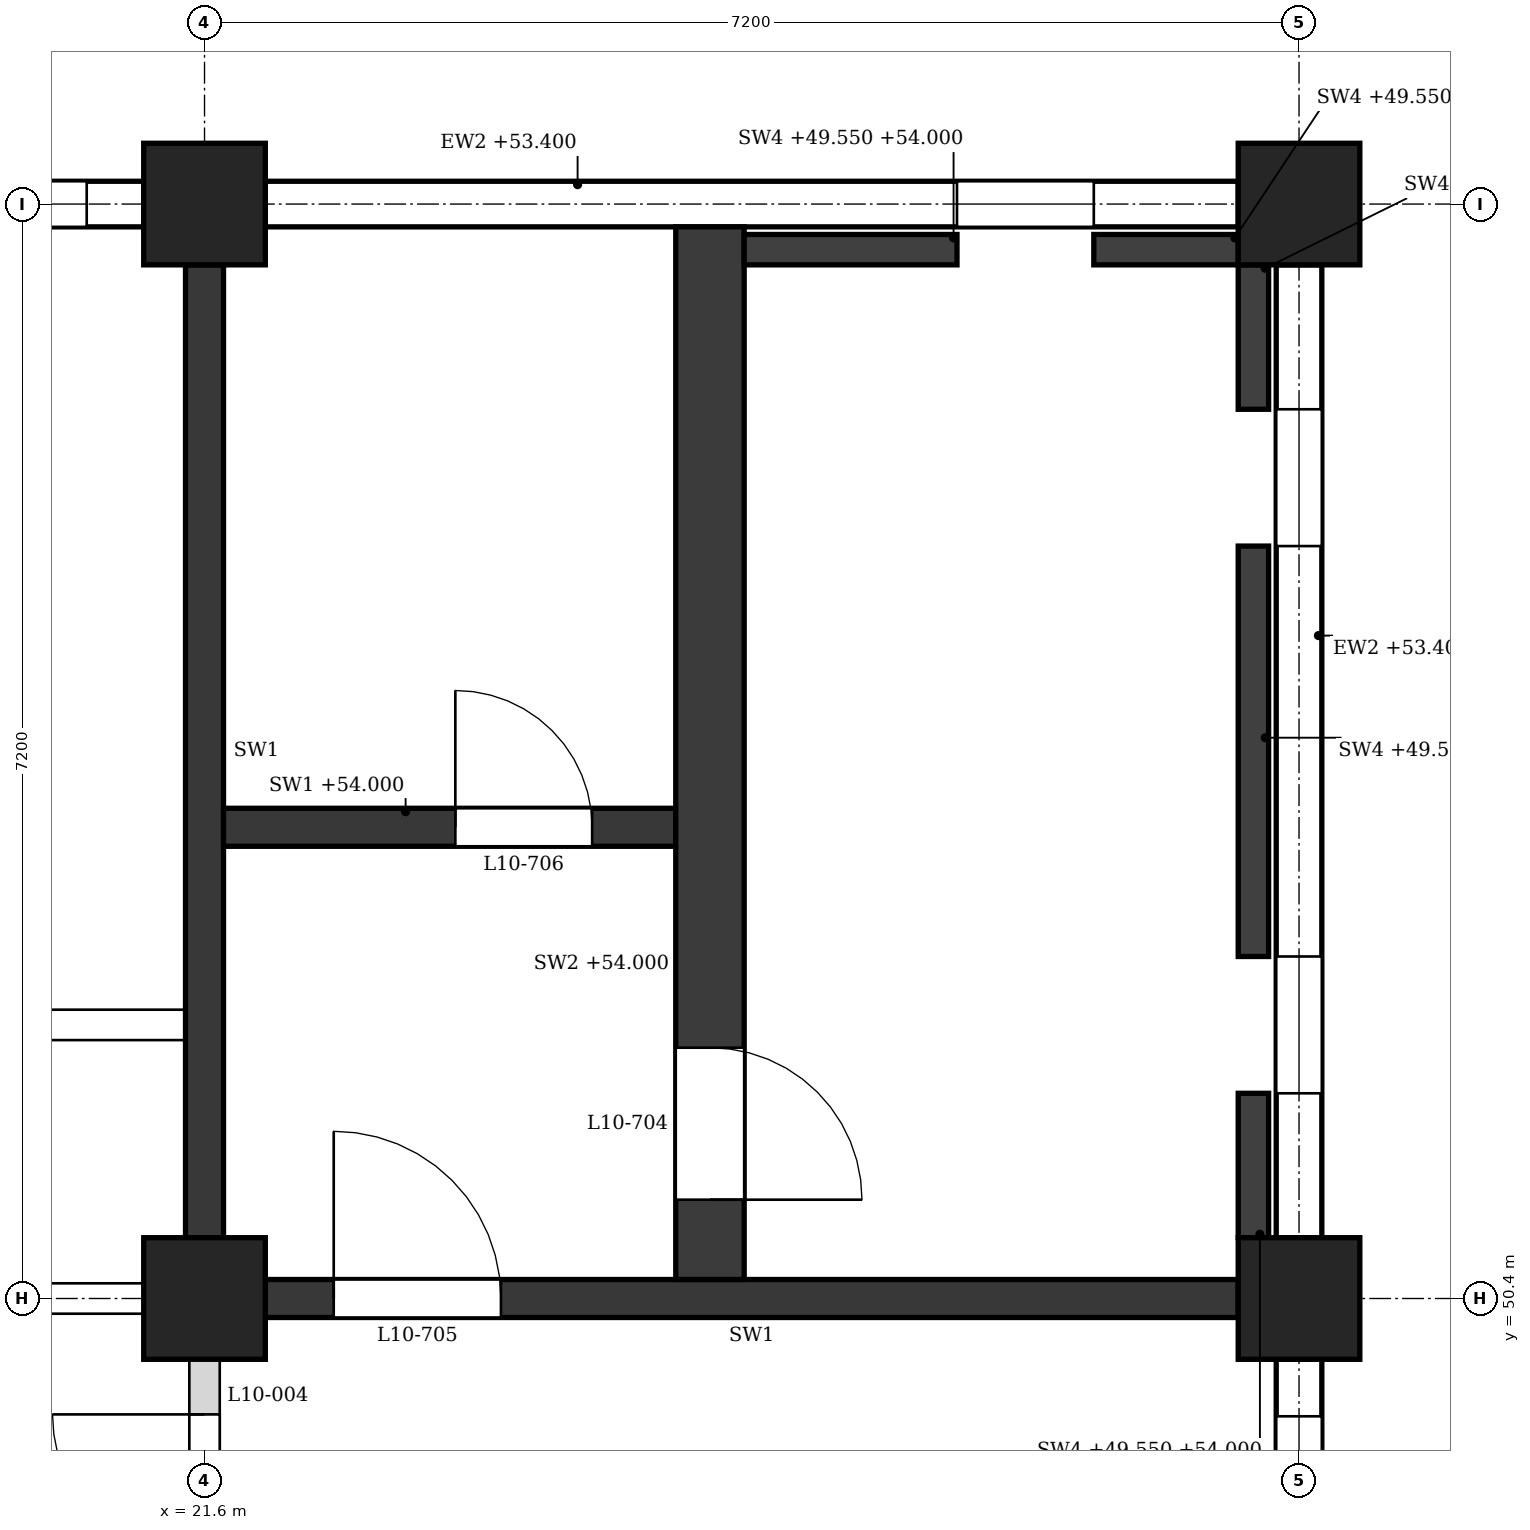
"""IFC4 building model, lengths in metres.
Left out: names, types, materials, properties, quantities, classifications, styles, units other than length and angle.
Written with IfcOpenShell. Run it as: python <this file> out.ifc"""

import sys

from ifc_helpers import new_model, si_unit, direction, frame, frame_2d, origin, origin_2d, place, context, subcontext, project, spatial, polyline, rectangle, outline, extrude, element, fill, save


model = new_model("IFC4")
c1 = context("Model", 3, precision=1e-05, world=origin(), true_north=direction((0.0, 1.0)))
c2 = subcontext(c1, "Body", "Model", "MODEL_VIEW")
j1 = project(units=[si_unit("LENGTHUNIT", "METRE"), si_unit("PLANEANGLEUNIT", "RADIAN")], contexts=[c1])
p1 = place(None, origin())
s1 = spatial("IfcSite", under=j1, at=p1, CompositionType="ELEMENT")
p2 = place(p1, origin())
s2 = spatial("IfcBuilding", under=s1, at=p2, CompositionType="ELEMENT")
p3 = place(p2, frame((0.0, 0.0, 49.8)))
s3 = spatial("IfcBuildingStorey", under=s2, at=p3, CompositionType="ELEMENT", Elevation=49.8)
for number, where, z_axis, x_axis in (
    (1, (21.6, 50.4, 0.0), (0.0, 0.0, 1.0), (1.0, 0.0, 0.0)),
    (2, (21.6, 57.6, 0.0), (0.0, 0.0, 1.0), (1.0, 0.0, 0.0)),
    (3, (28.8, 50.4, 0.0), (0.0, 0.0, 1.0), (1.0, 0.0, 0.0)),
    (4, (28.8, 57.6, 0.0), (0.0, 0.0, 1.0), (1.0, 0.0, 0.0)),
):
    element("IfcColumn", number, at=place(p3, frame(where, z_axis=z_axis, x_axis=x_axis)), inside=s3, PredefinedType="COLUMN", context=c2, shape_type="SweptSolid", body=[
        extrude(rectangle(XDim=0.8, YDim=0.8, at=origin_2d()), origin(), (0.0, 0.0, 1.0), 4.5),
    ])
p4 = place(p3, frame((28.4, 57.6, 0.0), z_axis=(0.0, 0.0, 1.0), x_axis=(-1.0, 0.0, 0.0)))
e5 = element("IfcWall", 5, at=p4, inside=s3, PredefinedType="STANDARD", context=c2, shape_type="SweptSolid", body=[
    extrude(rectangle(XDim=6.4, YDim=0.3, at=frame_2d((3.2, 0.0))), origin(), (0.0, 0.0, 1.0), 3.6),
])
p5 = place(p4, frame((0.95, 0.0, 0.9)))
e6 = element("IfcOpeningElement", 6, at=p5, cuts=e5, PredefinedType="OPENING", context=c2, shape_type="SweptSolid", body=[
    extrude(outline(polyline([(0.0, 0.0), (0.9, 0.0), (0.9, 2.15), (0.45, 2.6), (0.0, 2.15), (0.0, 0.0)])), frame((0.0, 0.16, 0.0), z_axis=(0.0, -1.0, 0.0), x_axis=(1.0, 0.0, 0.0)), (0.0, 0.0, 1.0), 0.32),
])
p6 = place(p3, frame((21.2, 57.6, 0.0), z_axis=(0.0, 0.0, 1.0), x_axis=(-1.0, 0.0, 0.0)))
e7 = element("IfcWall", 7, at=p6, inside=s3, PredefinedType="STANDARD", context=c2, shape_type="SweptSolid", body=[
    extrude(rectangle(XDim=6.4, YDim=0.3, at=frame_2d((3.2, 0.0))), origin(), (0.0, 0.0, 1.0), 3.6),
])
p7 = place(p6, frame((0.375, 0.0, 0.9)))
e8 = element("IfcOpeningElement", 8, at=p7, cuts=e7, PredefinedType="OPENING", context=c2, shape_type="SweptSolid", body=[
    extrude(outline(polyline([(0.0, 0.0), (0.45, 0.0), (0.45, 2.35), (0.225, 2.6), (0.0, 2.35), (0.0, 0.0)])), frame((0.0, 0.16, 0.0), z_axis=(0.0, -1.0, 0.0), x_axis=(1.0, 0.0, 0.0)), (0.0, 0.0, 1.0), 0.32),
])
p8 = place(p6, frame((1.175, 0.0, 0.9)))
e9 = element("IfcOpeningElement", 9, at=p8, cuts=e7, PredefinedType="OPENING", context=c2, shape_type="SweptSolid", body=[
    extrude(outline(polyline([(0.0, 0.0), (0.45, 0.0), (0.45, 2.35), (0.225, 2.6), (0.0, 2.35), (0.0, 0.0)])), frame((0.0, 0.16, 0.0), z_axis=(0.0, -1.0, 0.0), x_axis=(1.0, 0.0, 0.0)), (0.0, 0.0, 1.0), 0.32),
])
p9 = place(p6, frame((1.975, 0.0, 0.9)))
e10 = element("IfcOpeningElement", 10, at=p9, cuts=e7, PredefinedType="OPENING", context=c2, shape_type="SweptSolid", body=[
    extrude(outline(polyline([(0.0, 0.0), (0.45, 0.0), (0.45, 2.35), (0.225, 2.6), (0.0, 2.35), (0.0, 0.0)])), frame((0.0, 0.16, 0.0), z_axis=(0.0, -1.0, 0.0), x_axis=(1.0, 0.0, 0.0)), (0.0, 0.0, 1.0), 0.32),
])
p10 = place(p6, frame((3.975, 0.0, 0.9)))
e11 = element("IfcOpeningElement", 11, at=p10, cuts=e7, PredefinedType="OPENING", context=c2, shape_type="SweptSolid", body=[
    extrude(outline(polyline([(0.0, 0.0), (0.45, 0.0), (0.45, 2.35), (0.225, 2.6), (0.0, 2.35), (0.0, 0.0)])), frame((0.0, 0.16, 0.0), z_axis=(0.0, -1.0, 0.0), x_axis=(1.0, 0.0, 0.0)), (0.0, 0.0, 1.0), 0.32),
])
p11 = place(p6, frame((4.775, 0.0, 0.9)))
e12 = element("IfcOpeningElement", 12, at=p11, cuts=e7, PredefinedType="OPENING", context=c2, shape_type="SweptSolid", body=[
    extrude(outline(polyline([(0.0, 0.0), (0.45, 0.0), (0.45, 2.35), (0.225, 2.6), (0.0, 2.35), (0.0, 0.0)])), frame((0.0, 0.16, 0.0), z_axis=(0.0, -1.0, 0.0), x_axis=(1.0, 0.0, 0.0)), (0.0, 0.0, 1.0), 0.32),
])
p12 = place(p6, frame((5.575, 0.0, 0.9)))
e13 = element("IfcOpeningElement", 13, at=p12, cuts=e7, PredefinedType="OPENING", context=c2, shape_type="SweptSolid", body=[
    extrude(outline(polyline([(0.0, 0.0), (0.45, 0.0), (0.45, 2.35), (0.225, 2.6), (0.0, 2.35), (0.0, 0.0)])), frame((0.0, 0.16, 0.0), z_axis=(0.0, -1.0, 0.0), x_axis=(1.0, 0.0, 0.0)), (0.0, 0.0, 1.0), 0.32),
])
p13 = place(p3, frame((28.8, 43.6, 0.0), z_axis=(0.0, 0.0, 1.0), x_axis=(0.0, 1.0, 0.0)))
e14 = element("IfcWall", 14, at=p13, inside=s3, PredefinedType="STANDARD", context=c2, shape_type="SweptSolid", body=[
    extrude(rectangle(XDim=6.4, YDim=0.3, at=frame_2d((3.2, 0.0))), origin(), (0.0, 0.0, 1.0), 3.6),
])
p14 = place(p13, frame((3.975, 0.0, 0.9)))
e15 = element("IfcOpeningElement", 15, at=p14, cuts=e14, PredefinedType="OPENING", context=c2, shape_type="SweptSolid", body=[
    extrude(outline(polyline([(0.0, 0.0), (0.45, 0.0), (0.45, 2.35), (0.225, 2.6), (0.0, 2.35), (0.0, 0.0)])), frame((0.0, 0.16, 0.0), z_axis=(0.0, -1.0, 0.0), x_axis=(1.0, 0.0, 0.0)), (0.0, 0.0, 1.0), 0.32),
])
p15 = place(p13, frame((4.775, 0.0, 0.9)))
e16 = element("IfcOpeningElement", 16, at=p15, cuts=e14, PredefinedType="OPENING", context=c2, shape_type="SweptSolid", body=[
    extrude(outline(polyline([(0.0, 0.0), (0.45, 0.0), (0.45, 2.35), (0.225, 2.6), (0.0, 2.35), (0.0, 0.0)])), frame((0.0, 0.16, 0.0), z_axis=(0.0, -1.0, 0.0), x_axis=(1.0, 0.0, 0.0)), (0.0, 0.0, 1.0), 0.32),
])
p16 = place(p13, frame((5.575, 0.0, 0.9)))
e17 = element("IfcOpeningElement", 17, at=p16, cuts=e14, PredefinedType="OPENING", context=c2, shape_type="SweptSolid", body=[
    extrude(outline(polyline([(0.0, 0.0), (0.45, 0.0), (0.45, 2.35), (0.225, 2.6), (0.0, 2.35), (0.0, 0.0)])), frame((0.0, 0.16, 0.0), z_axis=(0.0, -1.0, 0.0), x_axis=(1.0, 0.0, 0.0)), (0.0, 0.0, 1.0), 0.32),
])
p17 = place(p3, frame((28.8, 50.8, 0.0), z_axis=(0.0, 0.0, 1.0), x_axis=(0.0, 1.0, 0.0)))
e18 = element("IfcWall", 18, at=p17, inside=s3, PredefinedType="STANDARD", context=c2, shape_type="SweptSolid", body=[
    extrude(rectangle(XDim=6.4, YDim=0.3, at=frame_2d((3.2, 0.0))), origin(), (0.0, 0.0, 1.0), 3.6),
])
p18 = place(p17, frame((0.95, 0.0, 0.9)))
e19 = element("IfcOpeningElement", 19, at=p18, cuts=e18, PredefinedType="OPENING", context=c2, shape_type="SweptSolid", body=[
    extrude(outline(polyline([(0.0, 0.0), (0.9, 0.0), (0.9, 2.15), (0.45, 2.6), (0.0, 2.15), (0.0, 0.0)])), frame((0.0, 0.16, 0.0), z_axis=(0.0, -1.0, 0.0), x_axis=(1.0, 0.0, 0.0)), (0.0, 0.0, 1.0), 0.32),
])
p19 = place(p17, frame((4.55, 0.0, 0.9)))
e20 = element("IfcOpeningElement", 20, at=p19, cuts=e18, PredefinedType="OPENING", context=c2, shape_type="SweptSolid", body=[
    extrude(outline(polyline([(0.0, 0.0), (0.9, 0.0), (0.9, 2.15), (0.45, 2.6), (0.0, 2.15), (0.0, 0.0)])), frame((0.0, 0.16, 0.0), z_axis=(0.0, -1.0, 0.0), x_axis=(1.0, 0.0, 0.0)), (0.0, 0.0, 1.0), 0.32),
])
p20 = place(p3, frame((22.0, 50.4, 0.0), z_axis=(0.0, 0.0, 1.0), x_axis=(1.0, 0.0, 0.0)))
e21 = element("IfcWall", 21, at=p20, inside=s3, PredefinedType="SHEAR", context=c2, shape_type="SweptSolid", body=[
    extrude(rectangle(XDim=6.4, YDim=0.25, at=frame_2d((3.2, 0.0))), origin(), (0.0, 0.0, 1.0), 3.55),
])
p21 = place(p20, frame((0.45, 0.0, 0.0)))
e22 = element("IfcOpeningElement", 22, at=p21, cuts=e21, PredefinedType="OPENING", context=c2, shape_type="SweptSolid", body=[
    extrude(rectangle(XDim=1.1, YDim=2.1, at=frame_2d((0.55, 1.05))), frame((0.0, 0.135, 0.0), z_axis=(0.0, -1.0, 0.0), x_axis=(1.0, 0.0, 0.0)), (0.0, 0.0, 1.0), 0.27),
])
p22 = place(p3, frame((21.6, 50.8, 0.0), z_axis=(0.0, 0.0, 1.0), x_axis=(0.0, 1.0, 0.0)))
e23 = element("IfcWall", 23, at=p22, inside=s3, PredefinedType="SHEAR", context=c2, shape_type="SweptSolid", body=[
    extrude(rectangle(XDim=6.4, YDim=0.25, at=frame_2d((3.2, 0.0))), origin(), (0.0, 0.0, 1.0), 3.55),
])
p23 = place(p3, frame((28.5, 50.8, -0.25), z_axis=(0.0, 0.0, 1.0), x_axis=(0.0, 1.0, 0.0)))
e24 = element("IfcWall", 24, at=p23, inside=s3, PredefinedType="SHEAR", context=c2, shape_type="SweptSolid", body=[
    extrude(rectangle(XDim=0.95, YDim=0.2, at=frame_2d((0.475, 0.0))), origin(), (0.0, 0.0, 1.0), 4.45),
])
p24 = place(p3, frame((28.5, 52.65, -0.25), z_axis=(0.0, 0.0, 1.0), x_axis=(0.0, 1.0, 0.0)))
e25 = element("IfcWall", 25, at=p24, inside=s3, PredefinedType="SHEAR", context=c2, shape_type="SweptSolid", body=[
    extrude(rectangle(XDim=2.7, YDim=0.2, at=frame_2d((1.35, 0.0))), origin(), (0.0, 0.0, 1.0), 4.45),
])
p25 = place(p3, frame((28.5, 56.25, -0.25), z_axis=(0.0, 0.0, 1.0), x_axis=(0.0, 1.0, 0.0)))
e26 = element("IfcWall", 26, at=p25, inside=s3, PredefinedType="SHEAR", context=c2, shape_type="SweptSolid", body=[
    extrude(rectangle(XDim=0.95, YDim=0.2, at=frame_2d((0.475, 0.0))), origin(), (0.0, 0.0, 1.0), 4.45),
])
p26 = place(p3, frame((25.15, 57.3, -0.25), z_axis=(0.0, 0.0, 1.0), x_axis=(1.0, 0.0, 0.0)))
e27 = element("IfcWall", 27, at=p26, inside=s3, PredefinedType="SHEAR", context=c2, shape_type="SweptSolid", body=[
    extrude(rectangle(XDim=1.4, YDim=0.2, at=frame_2d((0.7, 0.0))), origin(), (0.0, 0.0, 1.0), 4.45),
])
p27 = place(p3, frame((27.45, 57.3, -0.25), z_axis=(0.0, 0.0, 1.0), x_axis=(1.0, 0.0, 0.0)))
e28 = element("IfcWall", 28, at=p27, inside=s3, PredefinedType="SHEAR", context=c2, shape_type="SweptSolid", body=[
    extrude(rectangle(XDim=0.95, YDim=0.2, at=frame_2d((0.475, 0.0))), origin(), (0.0, 0.0, 1.0), 4.45),
])
p28 = place(p3, frame((24.925, 50.525, 0.0), z_axis=(0.0, 0.0, 1.0), x_axis=(0.0, 1.0, 0.0)))
e29 = element("IfcWall", 29, at=p28, inside=s3, PredefinedType="SHEAR", context=c2, shape_type="SweptSolid", body=[
    extrude(rectangle(XDim=6.925, YDim=0.45, at=frame_2d((3.462, 0.0))), origin(), (0.0, 0.0, 1.0), 4.2),
])
p29 = place(p28, frame((0.525, 0.0, 0.0)))
e30 = element("IfcOpeningElement", 30, at=p29, cuts=e29, PredefinedType="OPENING", context=c2, shape_type="SweptSolid", body=[
    extrude(rectangle(XDim=1.0, YDim=2.1, at=frame_2d((0.5, 1.05))), frame((0.0, 0.235, 0.0), z_axis=(0.0, -1.0, 0.0), x_axis=(1.0, 0.0, 0.0)), (0.0, 0.0, 1.0), 0.47),
])
p30 = place(p3, frame((21.725, 53.5, 0.0), z_axis=(0.0, 0.0, 1.0), x_axis=(1.0, 0.0, 0.0)))
e31 = element("IfcWall", 31, at=p30, inside=s3, PredefinedType="SHEAR", context=c2, shape_type="SweptSolid", body=[
    extrude(rectangle(XDim=2.975, YDim=0.25, at=frame_2d((1.487, 0.0))), origin(), (0.0, 0.0, 1.0), 4.2),
])
p31 = place(p30, frame((1.525, 0.0, 0.0)))
e32 = element("IfcOpeningElement", 32, at=p31, cuts=e31, PredefinedType="OPENING", context=c2, shape_type="SweptSolid", body=[
    extrude(rectangle(XDim=0.9, YDim=2.1, at=frame_2d((0.45, 1.05))), frame((0.0, 0.135, 0.0), z_axis=(0.0, -1.0, 0.0), x_axis=(1.0, 0.0, 0.0)), (0.0, 0.0, 1.0), 0.27),
])
p32 = place(p3, frame((14.8, 50.4, 0.0), z_axis=(0.0, 0.0, 1.0), x_axis=(1.0, 0.0, 0.0)))
e33 = element("IfcWall", 33, at=p32, inside=s3, PredefinedType="PARTITIONING", context=c2, shape_type="SweptSolid", body=[
    extrude(rectangle(XDim=6.4, YDim=0.2, at=frame_2d((3.2, 0.0))), origin(), (0.0, 0.0, 1.0), 3.55),
])
p33 = place(p32, frame((4.3, 0.0, 0.0)))
e34 = element("IfcOpeningElement", 34, at=p33, cuts=e33, PredefinedType="OPENING", context=c2, shape_type="SweptSolid", body=[
    extrude(rectangle(XDim=1.0, YDim=2.1, at=frame_2d((0.5, 1.05))), frame((0.0, 0.11, 0.0), z_axis=(0.0, -1.0, 0.0), x_axis=(1.0, 0.0, 0.0)), (0.0, 0.0, 1.0), 0.22),
])
p34 = place(p3, frame((7.325, 52.2, 0.0), z_axis=(0.0, 0.0, 1.0), x_axis=(1.0, 0.0, 0.0)))
e35 = element("IfcWall", 35, at=p34, inside=s3, PredefinedType="PARTITIONING", context=c2, shape_type="SweptSolid", body=[
    extrude(outline(polyline([(0.0, 0.0), (14.15, 0.0), (14.15, 3.55), (14.05, 3.55), (14.05, 4.2), (7.3, 4.2), (7.3, 3.55), (6.85, 3.55), (6.85, 4.2), (0.1, 4.2), (0.1, 3.55), (0.0, 3.55), (0.0, 0.0)])), frame((0.0, 0.1, 0.0), z_axis=(0.0, -1.0, 0.0), x_axis=(1.0, 0.0, 0.0)), (0.0, 0.0, 1.0), 0.2),
])
p35 = place(p34, frame((1.238, 0.0, 0.0)))
e36 = element("IfcOpeningElement", 36, at=p35, cuts=e35, PredefinedType="OPENING", context=c2, shape_type="SweptSolid", body=[
    extrude(rectangle(XDim=1.0, YDim=2.1, at=frame_2d((0.5, 1.05))), frame((0.0, 0.11, 0.0), z_axis=(0.0, -1.0, 0.0), x_axis=(1.0, 0.0, 0.0)), (0.0, 0.0, 1.0), 0.22),
])
p36 = place(p34, frame((4.775, 0.0, 0.0)))
e37 = element("IfcOpeningElement", 37, at=p36, cuts=e35, PredefinedType="OPENING", context=c2, shape_type="SweptSolid", body=[
    extrude(rectangle(XDim=1.0, YDim=2.1, at=frame_2d((0.5, 1.05))), frame((0.0, 0.11, 0.0), z_axis=(0.0, -1.0, 0.0), x_axis=(1.0, 0.0, 0.0)), (0.0, 0.0, 1.0), 0.22),
])
p37 = place(p34, frame((8.375, 0.0, 0.0)))
e38 = element("IfcOpeningElement", 38, at=p37, cuts=e35, PredefinedType="OPENING", context=c2, shape_type="SweptSolid", body=[
    extrude(rectangle(XDim=1.0, YDim=2.1, at=frame_2d((0.5, 1.05))), frame((0.0, 0.11, 0.0), z_axis=(0.0, -1.0, 0.0), x_axis=(1.0, 0.0, 0.0)), (0.0, 0.0, 1.0), 0.22),
])
p38 = place(p34, frame((11.913, 0.0, 0.0)))
e39 = element("IfcOpeningElement", 39, at=p38, cuts=e35, PredefinedType="OPENING", context=c2, shape_type="SweptSolid", body=[
    extrude(rectangle(XDim=1.0, YDim=2.1, at=frame_2d((0.5, 1.05))), frame((0.0, 0.11, 0.0), z_axis=(0.0, -1.0, 0.0), x_axis=(1.0, 0.0, 0.0)), (0.0, 0.0, 1.0), 0.22),
])
p39 = place(p3, frame((21.6, 47.275, 0.0), z_axis=(0.0, 0.0, 1.0), x_axis=(0.0, 1.0, 0.0)))
e40 = element("IfcWall", 40, at=p39, inside=s3, PredefinedType="PARTITIONING", context=c2, shape_type="SweptSolid", body=[
    extrude(rectangle(XDim=2.725, YDim=0.2, at=frame_2d((1.363, 0.0))), origin(), (0.0, 0.0, 1.0), 3.55),
])
p40 = place(p39, frame((0.363, 0.0, 0.0)))
e41 = element("IfcOpeningElement", 41, at=p40, cuts=e40, PredefinedType="OPENING", context=c2, shape_type="SweptSolid", body=[
    extrude(rectangle(XDim=2.0, YDim=2.4, at=frame_2d((1.0, 1.2))), frame((0.0, 0.11, 0.0), z_axis=(0.0, -1.0, 0.0), x_axis=(1.0, 0.0, 0.0)), (0.0, 0.0, 1.0), 0.22),
])
p41 = place(p16, origin())
e42 = element("IfcWindow", 42, at=p41, inside=s3, PartitioningType="SINGLE_PANEL", PredefinedType="WINDOW", context=c2, shape_type="SweptSolid", body=[
    extrude(outline(polyline([(0.0, 0.0), (0.45, 0.0), (0.45, 2.35), (0.225, 2.6), (0.0, 2.35), (0.0, 0.0)])), frame((0.0, 0.03, 0.0), z_axis=(0.0, -1.0, 0.0), x_axis=(1.0, 0.0, 0.0)), (0.0, 0.0, 1.0), 0.06),
])
fill(e17, e42)
p42 = place(p18, origin())
e43 = element("IfcWindow", 43, at=p42, inside=s3, PartitioningType="SINGLE_PANEL", PredefinedType="WINDOW", context=c2, shape_type="SweptSolid", body=[
    extrude(outline(polyline([(0.0, 0.0), (0.9, 0.0), (0.9, 2.15), (0.45, 2.6), (0.0, 2.15), (0.0, 0.0)])), frame((0.0, 0.03, 0.0), z_axis=(0.0, -1.0, 0.0), x_axis=(1.0, 0.0, 0.0)), (0.0, 0.0, 1.0), 0.06),
])
fill(e19, e43)
p43 = place(p19, origin())
e44 = element("IfcWindow", 44, at=p43, inside=s3, PartitioningType="SINGLE_PANEL", PredefinedType="WINDOW", context=c2, shape_type="SweptSolid", body=[
    extrude(outline(polyline([(0.0, 0.0), (0.9, 0.0), (0.9, 2.15), (0.45, 2.6), (0.0, 2.15), (0.0, 0.0)])), frame((0.0, 0.03, 0.0), z_axis=(0.0, -1.0, 0.0), x_axis=(1.0, 0.0, 0.0)), (0.0, 0.0, 1.0), 0.06),
])
fill(e20, e44)
p44 = place(p5, origin())
e45 = element("IfcWindow", 45, at=p44, inside=s3, PartitioningType="SINGLE_PANEL", PredefinedType="WINDOW", context=c2, shape_type="SweptSolid", body=[
    extrude(outline(polyline([(0.0, 0.0), (0.9, 0.0), (0.9, 2.15), (0.45, 2.6), (0.0, 2.15), (0.0, 0.0)])), frame((0.0, 0.03, 0.0), z_axis=(0.0, -1.0, 0.0), x_axis=(1.0, 0.0, 0.0)), (0.0, 0.0, 1.0), 0.06),
])
fill(e6, e45)
p45 = place(p7, origin())
e46 = element("IfcWindow", 46, at=p45, inside=s3, PartitioningType="SINGLE_PANEL", PredefinedType="WINDOW", context=c2, shape_type="SweptSolid", body=[
    extrude(outline(polyline([(0.0, 0.0), (0.45, 0.0), (0.45, 2.35), (0.225, 2.6), (0.0, 2.35), (0.0, 0.0)])), frame((0.0, 0.03, 0.0), z_axis=(0.0, -1.0, 0.0), x_axis=(1.0, 0.0, 0.0)), (0.0, 0.0, 1.0), 0.06),
])
fill(e8, e46)
p46 = place(p29, frame((1.0, 0.0, 0.0), z_axis=(0.0, 0.0, 1.0), x_axis=(-1.0, 0.0, 0.0)))
e47 = element("IfcDoor", 47, at=p46, inside=s3, OperationType="SINGLE_SWING_RIGHT", PredefinedType="DOOR", context=c2, shape_type="SweptSolid", body=[
    extrude(rectangle(XDim=1.0, YDim=2.1, at=frame_2d((0.5, 1.05))), frame((0.0, 0.025, 0.0), z_axis=(0.0, -1.0, 0.0), x_axis=(1.0, 0.0, 0.0)), (0.0, 0.0, 1.0), 0.05),
])
fill(e30, e47)
p47 = place(p21, origin())
e48 = element("IfcDoor", 48, at=p47, inside=s3, OperationType="SINGLE_SWING_LEFT", PredefinedType="DOOR", context=c2, shape_type="SweptSolid", body=[
    extrude(rectangle(XDim=1.1, YDim=2.1, at=frame_2d((0.55, 1.05))), frame((0.0, 0.025, 0.0), z_axis=(0.0, -1.0, 0.0), x_axis=(1.0, 0.0, 0.0)), (0.0, 0.0, 1.0), 0.05),
])
fill(e22, e48)
p48 = place(p31, origin())
e49 = element("IfcDoor", 49, at=p48, inside=s3, OperationType="SINGLE_SWING_LEFT", PredefinedType="DOOR", context=c2, shape_type="SweptSolid", body=[
    extrude(rectangle(XDim=0.9, YDim=2.1, at=frame_2d((0.45, 1.05))), frame((0.0, 0.025, 0.0), z_axis=(0.0, -1.0, 0.0), x_axis=(1.0, 0.0, 0.0)), (0.0, 0.0, 1.0), 0.05),
])
fill(e32, e49)
p49 = place(p40, origin())
e50 = element("IfcDoor", 50, at=p49, inside=s3, OperationType="DOUBLE_DOOR_SINGLE_SWING", PredefinedType="DOOR", context=c2, shape_type="SweptSolid", body=[
    extrude(rectangle(XDim=2.0, YDim=2.4, at=frame_2d((1.0, 1.2))), frame((0.0, 0.025, 0.0), z_axis=(0.0, -1.0, 0.0), x_axis=(1.0, 0.0, 0.0)), (0.0, 0.0, 1.0), 0.05),
])
fill(e41, e50)
save(model, sys.argv[1])
